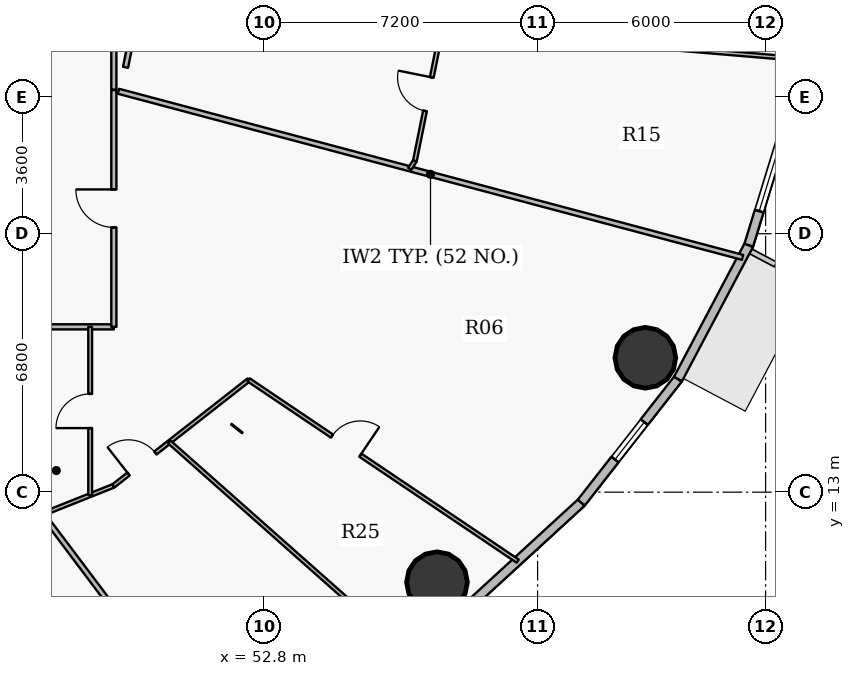
"""IFC4 building model, lengths in metres.
Left out: names, types, materials, properties, quantities, classifications, styles, units other than length and angle.
Written with IfcOpenShell. Run it as: python <this file> out.ifc"""

import sys

from ifc_helpers import new_model, si_unit, direction, frame, frame_2d, origin, origin_2d, place, context, subcontext, project, spatial, rectangle, hollow_circle, extrude, source, transform, mapped, element, fill, save


model = new_model("IFC4")
c1 = context("Model", 3, precision=1e-05, world=origin(), true_north=direction((0.0, 1.0)))
c2 = subcontext(c1, "Body", "Model", "MODEL_VIEW")
j1 = project(units=[si_unit("LENGTHUNIT", "METRE"), si_unit("PLANEANGLEUNIT", "RADIAN")], contexts=[c1])
p1 = place(None, origin())
s1 = spatial("IfcSite", under=j1, at=p1, CompositionType="ELEMENT")
p2 = place(p1, origin())
s2 = spatial("IfcBuilding", under=s1, at=p2, CompositionType="ELEMENT")
p3 = place(p2, frame((0.0, 0.0, 70.2)))
s3 = spatial("IfcBuildingStorey", under=s2, at=p3, CompositionType="ELEMENT", Elevation=70.2)
for number, where, z_axis, x_axis in (
    (1, (57.353, 10.631, 0.0), (0.0, 0.0, 1.0), (1.0, 0.0, 0.0)),
    (2, (62.835, 16.536, 0.0), (0.0, 0.0, 1.0), (1.0, 0.0, 0.0)),
):
    element("IfcColumn", number, at=place(p3, frame(where, z_axis=z_axis, x_axis=x_axis)), inside=s3, PredefinedType="COLUMN", context=c2, shape_type="SweptSolid", body=[
        extrude(hollow_circle(Radius=0.8, WallThickness=0.045, at=origin_2d()), origin(), (0.0, 0.0, 1.0), 4.2),
    ])
p4 = place(p3, frame((61.15, 12.725, 0.0), z_axis=(0.0, 0.0, 1.0), x_axis=(-0.737116376281, -0.67576582321, 0.0)))
e3 = element("IfcWall", 3, at=p4, inside=s3, PredefinedType="SOLIDWALL", context=c2, shape_type="SweptSolid", body=[
    extrude(rectangle(XDim=4.294, YDim=0.24, at=frame_2d((2.147, 0.0))), origin(), (0.0, 0.0, 1.0), 3.95),
])
p5 = place(p3, frame((63.695, 15.977, 0.0), z_axis=(0.0, 0.0, 1.0), x_axis=(-0.616295508253, -0.787514981767, 0.0)))
e4 = element("IfcWall", 4, at=p5, inside=s3, PredefinedType="SOLIDWALL", context=c2, shape_type="SweptSolid", body=[
    extrude(rectangle(XDim=4.129, YDim=0.24, at=frame_2d((2.065, 0.0))), origin(), (0.0, 0.0, 1.0), 3.95),
])
p6 = place(p5, frame((1.44, 0.0, 0.9)))
e5 = element("IfcOpeningElement", 5, at=p6, cuts=e4, PredefinedType="OPENING", context=c2, shape_type="SweptSolid", body=[
    extrude(rectangle(XDim=1.25, YDim=1.65, at=origin_2d()), frame((0.625, 0.13, 0.825), z_axis=(0.0, -1.0, 0.0), x_axis=(1.0, 0.0, 0.0)), (0.0, 0.0, 1.0), 0.26),
])
p7 = place(p3, frame((65.558, 19.499, 0.0), z_axis=(0.0, 0.0, 1.0), x_axis=(-0.467662443071, -0.883907144072, 0.0)))
e6 = element("IfcWall", 6, at=p7, inside=s3, PredefinedType="SOLIDWALL", context=c2, shape_type="SweptSolid", body=[
    extrude(rectangle(XDim=3.984, YDim=0.24, at=frame_2d((1.992, 0.0))), origin(), (0.0, 0.0, 1.0), 3.95),
])
p8 = place(p3, frame((66.693, 23.203, 0.0), z_axis=(0.0, 0.0, 1.0), x_axis=(-0.293111631758, -0.956078224482, 0.0)))
e7 = element("IfcWall", 7, at=p8, inside=s3, PredefinedType="SOLIDWALL", context=c2, shape_type="SweptSolid", body=[
    extrude(rectangle(XDim=3.875, YDim=0.24, at=frame_2d((1.938, 0.0))), origin(), (0.0, 0.0, 1.0), 3.95),
])
p9 = place(p8, frame((0.938, 0.0, 0.9)))
e8 = element("IfcOpeningElement", 8, at=p9, cuts=e7, PredefinedType="OPENING", context=c2, shape_type="SweptSolid", body=[
    extrude(rectangle(XDim=2.0, YDim=1.75, at=origin_2d()), frame((1.0, 0.13, 0.875), z_axis=(0.0, -1.0, 0.0), x_axis=(1.0, 0.0, 0.0)), (0.0, 0.0, 1.0), 0.26),
])
p10 = place(p3, frame((41.679, 17.35, 0.0), z_axis=(0.0, 0.0, 1.0), x_axis=(1.0, 0.0, 0.0)))
e9 = element("IfcWall", 9, at=p10, inside=s3, PredefinedType="PARTITIONING", context=c2, shape_type="SweptSolid", body=[
    extrude(rectangle(XDim=7.171, YDim=0.135, at=frame_2d((3.586, 0.0))), origin(), (0.0, 0.0, 1.0), 3.285),
])
p11 = place(p3, frame((42.749, 10.736, 0.0), z_axis=(0.0, 0.0, 1.0), x_axis=(0.928807683782, 0.370562122386, 0.0)))
e10 = element("IfcWall", 10, at=p11, inside=s3, PredefinedType="PARTITIONING", context=c2, shape_type="SweptSolid", body=[
    extrude(rectangle(XDim=6.555, YDim=0.1, at=frame_2d((3.277, 0.0))), origin(), (0.0, 0.0, 1.0), 3.285),
])
p12 = place(p3, frame((43.263, 17.35, 0.0), z_axis=(0.0, 0.0, 1.0), x_axis=(0.601348900386, -0.798986545571, 0.0)))
e11 = element("IfcWall", 11, at=p12, inside=s3, PredefinedType="PARTITIONING", context=c2, shape_type="SweptSolid", body=[
    extrude(rectangle(XDim=14.065, YDim=0.135, at=frame_2d((7.032, 0.0))), origin(), (0.0, 0.0, 1.0), 3.335),
])
p13 = place(p3, frame((48.227, 12.921, 0.0), z_axis=(0.0, 0.0, 1.0), x_axis=(0.0, 1.0, 0.0)))
e12 = element("IfcWall", 12, at=p13, inside=s3, PredefinedType="PARTITIONING", context=c2, shape_type="SweptSolid", body=[
    extrude(rectangle(XDim=4.429, YDim=0.1, at=frame_2d((2.214, 0.0))), origin(), (0.0, 0.0, 1.0), 3.95),
])
p14 = place(p13, frame((1.764, 0.0, 0.0)))
e13 = element("IfcOpeningElement", 13, at=p14, cuts=e12, PredefinedType="OPENING", context=c2, shape_type="SweptSolid", body=[
    extrude(rectangle(XDim=0.9, YDim=2.1, at=origin_2d()), frame((0.45, 0.06, 1.05), z_axis=(0.0, -1.0, 0.0), x_axis=(1.0, 0.0, 0.0)), (0.0, 0.0, 1.0), 0.12),
])
p15 = place(p3, frame((48.837, 13.165, 0.0), z_axis=(0.0, 0.0, 1.0), x_axis=(0.787356886128, 0.616497472717, 0.0)))
e14 = element("IfcWall", 14, at=p15, inside=s3, PredefinedType="PARTITIONING", context=c2, shape_type="SweptSolid", body=[
    extrude(rectangle(XDim=4.522, YDim=0.1, at=frame_2d((2.261, 0.0))), origin(), (0.0, 0.0, 1.0), 3.285),
])
p16 = place(p15, frame((0.506, 0.0, 0.0)))
e15 = element("IfcOpeningElement", 15, at=p16, cuts=e14, PredefinedType="OPENING", context=c2, shape_type="SweptSolid", body=[
    extrude(rectangle(XDim=0.9, YDim=2.1, at=origin_2d()), frame((0.45, 0.06, 1.05), z_axis=(0.0, -1.0, 0.0), x_axis=(1.0, 0.0, 0.0)), (0.0, 0.0, 1.0), 0.12),
])
p17 = place(p3, frame((48.85, 17.35, 0.0), z_axis=(0.0, 0.0, 1.0), x_axis=(0.0, 1.0, 0.0)))
e16 = element("IfcWall", 16, at=p17, inside=s3, PredefinedType="PARTITIONING", context=c2, shape_type="SweptSolid", body=[
    extrude(rectangle(XDim=6.23, YDim=0.135, at=frame_2d((3.115, 0.0))), origin(), (0.0, 0.0, 1.0), 3.285),
])
p18 = place(p17, frame((2.615, 0.0, 0.0)))
e17 = element("IfcOpeningElement", 17, at=p18, cuts=e16, PredefinedType="OPENING", context=c2, shape_type="SweptSolid", body=[
    extrude(rectangle(XDim=1.0, YDim=2.15, at=origin_2d()), frame((0.5, 0.078, 1.075), z_axis=(0.0, -1.0, 0.0), x_axis=(1.0, 0.0, 0.0)), (0.0, 0.0, 1.0), 0.155),
])
p19 = place(p3, frame((48.971, 23.548, 0.0), z_axis=(0.0, 0.0, 1.0), x_axis=(0.966368341592, -0.257161871917, 0.0)))
e18 = element("IfcWall", 18, at=p19, inside=s3, PredefinedType="PARTITIONING", context=c2, shape_type="SweptSolid", body=[
    extrude(rectangle(XDim=16.994, YDim=0.135, at=frame_2d((8.497, 0.0))), origin(), (0.0, 0.0, 1.0), 3.335),
])
p20 = place(p3, frame((50.311, 14.319, 0.0), z_axis=(0.0, 0.0, 1.0), x_axis=(0.748425458021, -0.663218918447, 0.0)))
e19 = element("IfcWall", 19, at=p20, inside=s3, PredefinedType="PARTITIONING", context=c2, shape_type="SweptSolid", body=[
    extrude(rectangle(XDim=8.278, YDim=0.1, at=frame_2d((4.139, 0.0))), origin(), (0.0, 0.0, 1.0), 3.335),
])
p21 = place(p3, frame((52.398, 15.953, 0.0), z_axis=(0.0, 0.0, 1.0), x_axis=(0.829356044666, -0.558720458884, 0.0)))
e20 = element("IfcWall", 20, at=p21, inside=s3, PredefinedType="PARTITIONING", context=c2, shape_type="SweptSolid", body=[
    extrude(rectangle(XDim=8.535, YDim=0.1, at=frame_2d((4.267, 0.0))), origin(), (0.0, 0.0, 1.0), 3.335),
])
p22 = place(p21, frame((2.643, 0.0, 0.0)))
e21 = element("IfcOpeningElement", 21, at=p22, cuts=e20, PredefinedType="OPENING", context=c2, shape_type="SweptSolid", body=[
    extrude(rectangle(XDim=0.9, YDim=2.1, at=origin_2d()), frame((0.45, 0.06, 1.05), z_axis=(0.0, -1.0, 0.0), x_axis=(1.0, 0.0, 0.0)), (0.0, 0.0, 1.0), 0.12),
])
p23 = place(p3, frame((56.636, 21.509, 0.0), z_axis=(0.0, 0.0, 1.0), x_axis=(0.544849315021, 0.838533973027, 0.0)))
e22 = element("IfcWall", 22, at=p23, inside=s3, PredefinedType="PARTITIONING", context=c2, shape_type="SweptSolid", body=[
    extrude(rectangle(XDim=0.247, YDim=0.1, at=frame_2d((0.124, 0.0))), origin(), (0.0, 0.0, 1.0), 3.95),
])
p24 = place(p3, frame((56.771, 21.716, 0.0), z_axis=(0.0, 0.0, 1.0), x_axis=(0.198292702032, 0.980142848936, 0.0)))
e23 = element("IfcWall", 23, at=p24, inside=s3, PredefinedType="PARTITIONING", context=c2, shape_type="SweptSolid", body=[
    extrude(rectangle(XDim=5.392, YDim=0.1, at=frame_2d((2.696, 0.0))), origin(), (0.0, 0.0, 1.0), 3.285),
])
p25 = place(p24, frame((1.343, 0.0, 0.0)))
e24 = element("IfcOpeningElement", 24, at=p25, cuts=e23, PredefinedType="OPENING", context=c2, shape_type="SweptSolid", body=[
    extrude(rectangle(XDim=0.9, YDim=2.1, at=origin_2d()), frame((0.45, 0.06, 1.05), z_axis=(0.0, -1.0, 0.0), x_axis=(1.0, 0.0, 0.0)), (0.0, 0.0, 1.0), 0.12),
])
p26 = place(p3, frame((57.474, 25.191, 0.0), z_axis=(0.0, 0.0, 1.0), x_axis=(0.996471574276, -0.083930933863, 0.0)))
e25 = element("IfcWall", 25, at=p26, inside=s3, PredefinedType="PARTITIONING", context=c2, shape_type="SweptSolid", body=[
    extrude(rectangle(XDim=9.378, YDim=0.1, at=frame_2d((4.689, 0.0))), origin(), (0.0, 0.0, 1.0), 3.335),
])
p27 = place(p3, frame((48.85, 27.528, 0.0), z_axis=(0.0, 0.0, 1.0), x_axis=(0.0, -1.0, 0.0)))
e26 = element("IfcWall", 26, at=p27, inside=s3, PredefinedType="PARTITIONING", context=c2, shape_type="SweptSolid", body=[
    extrude(rectangle(XDim=3.938, YDim=0.135, at=frame_2d((1.969, 0.0))), origin(), (0.0, 0.0, 1.0), 3.285),
])
p28 = place(p3, frame((49.157, 24.18, 0.0), z_axis=(0.0, 0.0, 1.0), x_axis=(0.19828576171, 0.980144253007, 0.0)))
e27 = element("IfcWall", 27, at=p28, inside=s3, PredefinedType="PARTITIONING", context=c2, shape_type="SweptSolid", body=[
    extrude(rectangle(XDim=2.877, YDim=0.135, at=frame_2d((1.439, 0.0))), origin(), (0.0, 0.0, 1.0), 3.285),
])
m1 = source(origin(), c2, "Body", "SweptSolid", [
    extrude(rectangle(XDim=2.0, YDim=1.75, at=origin_2d()), frame((1.0, 0.03, 0.875), z_axis=(0.0, -1.0, 0.0), x_axis=(1.0, 0.0, 0.0)), (0.0, 0.0, 1.0), 0.06),
])
p29 = place(p9, origin())
e28 = element("IfcWindow", 28, at=p29, inside=s3, PartitioningType="DOUBLE_PANEL_VERTICAL", PredefinedType="WINDOW", context=c2, shape_type="MappedRepresentation", body=[
    mapped(m1, transform((0.0, 0.0, 0.0), x_axis=(1.0, 0.0, 0.0), y_axis=(0.0, 1.0, 0.0), z_axis=(0.0, 0.0, 1.0), scale=1.0)),
])
fill(e8, e28)
m2 = source(origin(), c2, "Body", "SweptSolid", [
    extrude(rectangle(XDim=1.25, YDim=1.65, at=origin_2d()), frame((0.625, 0.03, 0.825), z_axis=(0.0, -1.0, 0.0), x_axis=(1.0, 0.0, 0.0)), (0.0, 0.0, 1.0), 0.06),
])
p30 = place(p6, origin())
e29 = element("IfcWindow", 29, at=p30, inside=s3, PartitioningType="SINGLE_PANEL", PredefinedType="WINDOW", context=c2, shape_type="MappedRepresentation", body=[
    mapped(m2, transform((0.0, 0.0, 0.0), x_axis=(1.0, 0.0, 0.0), y_axis=(0.0, 1.0, 0.0), z_axis=(0.0, 0.0, 1.0), scale=1.0)),
])
fill(e5, e29)
m3 = source(origin(), c2, "Body", "SweptSolid", [
    extrude(rectangle(XDim=1.0, YDim=2.15, at=origin_2d()), frame((0.5, 0.025, 1.075), z_axis=(0.0, -1.0, 0.0), x_axis=(1.0, 0.0, 0.0)), (0.0, 0.0, 1.0), 0.05),
])
p31 = place(p18, origin())
e30 = element("IfcDoor", 30, at=p31, inside=s3, OperationType="SINGLE_SWING_RIGHT", PredefinedType="DOOR", context=c2, shape_type="MappedRepresentation", body=[
    mapped(m3, transform((0.0, 0.0, 0.0), x_axis=(1.0, 0.0, 0.0), y_axis=(0.0, 1.0, 0.0), z_axis=(0.0, 0.0, 1.0), scale=1.0)),
])
fill(e17, e30)
m4 = source(origin(), c2, "Body", "SweptSolid", [
    extrude(rectangle(XDim=0.9, YDim=2.1, at=origin_2d()), frame((0.45, 0.025, 1.05), z_axis=(0.0, -1.0, 0.0), x_axis=(1.0, 0.0, 0.0)), (0.0, 0.0, 1.0), 0.05),
])
p32 = place(p16, origin())
e31 = element("IfcDoor", 31, at=p32, inside=s3, OperationType="SINGLE_SWING_LEFT", PredefinedType="DOOR", context=c2, shape_type="MappedRepresentation", body=[
    mapped(m4, transform((0.0, 0.0, 0.0), x_axis=(1.0, 0.0, 0.0), y_axis=(0.0, 1.0, 0.0), z_axis=(0.0, 0.0, 1.0), scale=1.0)),
])
fill(e15, e31)
p33 = place(p22, origin())
e32 = element("IfcDoor", 32, at=p33, inside=s3, OperationType="SINGLE_SWING_RIGHT", PredefinedType="DOOR", context=c2, shape_type="MappedRepresentation", body=[
    mapped(m4, transform((0.0, 0.0, 0.0), x_axis=(1.0, 0.0, 0.0), y_axis=(0.0, 1.0, 0.0), z_axis=(0.0, 0.0, 1.0), scale=1.0)),
])
fill(e21, e32)
p34 = place(p14, origin())
e33 = element("IfcDoor", 33, at=p34, inside=s3, OperationType="SINGLE_SWING_LEFT", PredefinedType="DOOR", context=c2, shape_type="MappedRepresentation", body=[
    mapped(m4, transform((0.0, 0.0, 0.0), x_axis=(1.0, 0.0, 0.0), y_axis=(0.0, 1.0, 0.0), z_axis=(0.0, 0.0, 1.0), scale=1.0)),
])
fill(e13, e33)
p35 = place(p25, origin())
e34 = element("IfcDoor", 34, at=p35, inside=s3, OperationType="SINGLE_SWING_RIGHT", PredefinedType="DOOR", context=c2, shape_type="MappedRepresentation", body=[
    mapped(m4, transform((0.0, 0.0, 0.0), x_axis=(1.0, 0.0, 0.0), y_axis=(0.0, 1.0, 0.0), z_axis=(0.0, 0.0, 1.0), scale=1.0)),
])
fill(e24, e34)
save(model, sys.argv[1])
